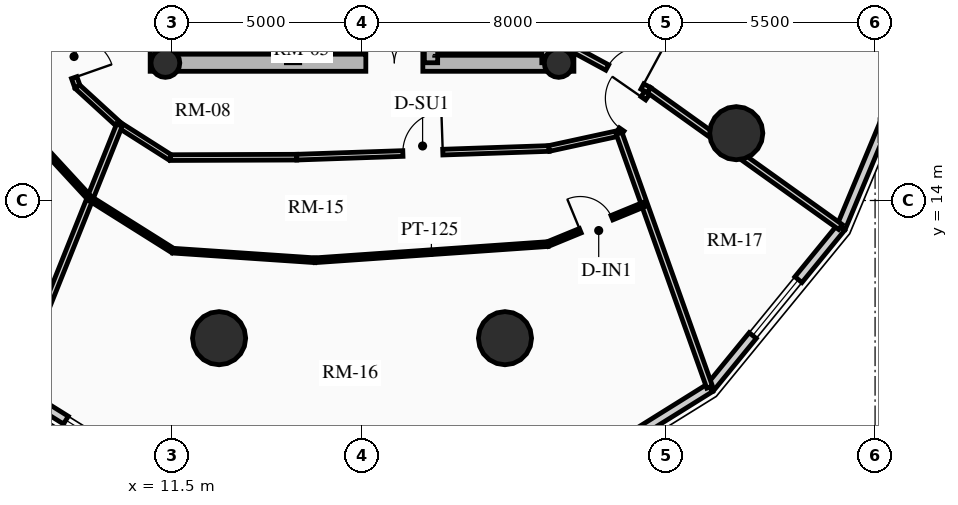
"""IFC4 building model, lengths in metres.
Left out: names, types, materials, properties, quantities, classifications, styles, units other than length and angle.
Written with IfcOpenShell. Run it as: python <this file> out.ifc"""

import sys

from ifc_helpers import new_model, si_unit, direction, frame, frame_2d, origin, origin_2d, place, context, subcontext, project, spatial, rectangle, circle, hollow_circle, extrude, source, transform, mapped, element, fill, save


model = new_model("IFC4")
c1 = context("Model", 3, precision=1e-05, world=origin(), true_north=direction((0.0, 1.0)))
c2 = subcontext(c1, "Body", "Model", "MODEL_VIEW")
j1 = project(units=[si_unit("LENGTHUNIT", "METRE"), si_unit("PLANEANGLEUNIT", "RADIAN")], contexts=[c1])
p1 = place(None, origin())
s1 = spatial("IfcSite", under=j1, at=p1, CompositionType="ELEMENT")
p2 = place(p1, origin())
s2 = spatial("IfcBuilding", under=s1, at=p2, CompositionType="ELEMENT")
p3 = place(p2, frame((0.0, 0.0, 105.07)))
s3 = spatial("IfcBuildingStorey", under=s2, at=p3, CompositionType="ELEMENT", Elevation=105.07)
for number, where, z_axis, x_axis in (
    (1, (11.15, 17.4, 0.0), (0.0, 0.0, 1.0), (0.0, 1.0, 0.0)),
    (2, (21.85, 17.4, 0.0), (0.0, 0.0, 1.0), (0.0, 1.0, 0.0)),
):
    element("IfcWall", number, at=place(p3, frame(where, z_axis=z_axis, x_axis=x_axis)), inside=s3, PredefinedType="SHEAR", context=c2, shape_type="SweptSolid", body=[
        extrude(rectangle(XDim=14.2, YDim=0.45, at=frame_2d((7.1, 0.0))), origin(), (0.0, 0.0, 1.0), 2.91),
    ])
p4 = place(p3, frame((11.15, 17.625, 0.0), z_axis=(0.0, 0.0, 1.0), x_axis=(1.0, 0.0, 0.0)))
e3 = element("IfcWall", 3, at=p4, inside=s3, PredefinedType="SHEAR", context=c2, shape_type="SweptSolid", body=[
    extrude(rectangle(XDim=10.7, YDim=0.45, at=frame_2d((5.35, 0.0))), origin(), (0.0, 0.0, 1.0), 2.91),
])
m1 = source(origin(), c2, "Body", "SweptSolid", [
    extrude(rectangle(XDim=1.5, YDim=2.02, at=frame_2d((0.75, 1.01))), frame((0.0, 0.235, 0.0), z_axis=(0.0, -1.0, 0.0), x_axis=(1.0, 0.0, 0.0)), (0.0, 0.0, 1.0), 0.47),
])
p5 = place(p4, frame((5.45, 0.0, 0.0)))
e4 = element("IfcOpeningElement", 4, at=p5, cuts=e3, PredefinedType="OPENING", context=c2, shape_type="MappedRepresentation", body=[
    mapped(m1, transform((0.0, 0.0, 0.0), x_axis=(1.0, 0.0, 0.0), y_axis=(0.0, 1.0, 0.0), z_axis=(0.0, 0.0, 1.0), scale=1.0)),
])
p6 = place(p3, frame((14.685, 17.625, 0.0), z_axis=(0.0, 0.0, 1.0), x_axis=(0.0, 1.0, 0.0)))
e5 = element("IfcWall", 5, at=p6, inside=s3, PredefinedType="SHEAR", context=c2, shape_type="SweptSolid", body=[
    extrude(rectangle(XDim=13.75, YDim=0.35, at=frame_2d((6.875, 0.0))), origin(), (0.0, 0.0, 1.0), 2.91),
])
m2 = source(origin(), c2, "Body", "SweptSolid", [
    extrude(rectangle(XDim=1.1, YDim=2.015, at=frame_2d((0.55, 1.007))), frame((0.0, 0.185, 0.0), z_axis=(0.0, -1.0, 0.0), x_axis=(1.0, 0.0, 0.0)), (0.0, 0.0, 1.0), 0.37),
])
p7 = place(p6, frame((4.875, 0.0, 0.0)))
e6 = element("IfcOpeningElement", 6, at=p7, cuts=e5, PredefinedType="OPENING", context=c2, shape_type="MappedRepresentation", body=[
    mapped(m2, transform((0.0, 0.0, 0.0), x_axis=(1.0, 0.0, 0.0), y_axis=(0.0, 1.0, 0.0), z_axis=(0.0, 0.0, 1.0), scale=1.0)),
])
m3 = source(origin(), c2, "Body", "SweptSolid", [
    extrude(rectangle(XDim=1.15, YDim=2.02, at=frame_2d((0.575, 1.01))), frame((0.0, 0.185, 0.0), z_axis=(0.0, -1.0, 0.0), x_axis=(1.0, 0.0, 0.0)), (0.0, 0.0, 1.0), 0.37),
])
p8 = place(p6, frame((7.295, 0.0, 0.0)))
e7 = element("IfcOpeningElement", 7, at=p8, cuts=e5, PredefinedType="OPENING", context=c2, shape_type="MappedRepresentation", body=[
    mapped(m3, transform((0.0, 0.0, 0.0), x_axis=(1.0, 0.0, 0.0), y_axis=(0.0, 1.0, 0.0), z_axis=(0.0, 0.0, 1.0), scale=1.0)),
])
p9 = place(p3, frame((18.315, 17.625, 0.0), z_axis=(0.0, 0.0, 1.0), x_axis=(0.0, 1.0, 0.0)))
e8 = element("IfcWall", 8, at=p9, inside=s3, PredefinedType="SHEAR", context=c2, shape_type="SweptSolid", body=[
    extrude(rectangle(XDim=13.75, YDim=0.35, at=frame_2d((6.875, 0.0))), origin(), (0.0, 0.0, 1.0), 2.91),
])
p10 = place(p9, frame((10.0, 0.0, 0.0)))
e9 = element("IfcOpeningElement", 9, at=p10, cuts=e8, PredefinedType="OPENING", context=c2, shape_type="MappedRepresentation", body=[
    mapped(m2, transform((0.0, 0.0, 0.0), x_axis=(1.0, 0.0, 0.0), y_axis=(0.0, 1.0, 0.0), z_axis=(0.0, 0.0, 1.0), scale=1.0)),
])
p11 = place(p9, frame((12.0, 0.0, 0.0)))
e10 = element("IfcOpeningElement", 10, at=p11, cuts=e8, PredefinedType="OPENING", context=c2, shape_type="MappedRepresentation", body=[
    mapped(m2, transform((0.0, 0.0, 0.0), x_axis=(1.0, 0.0, 0.0), y_axis=(0.0, 1.0, 0.0), z_axis=(0.0, 0.0, 1.0), scale=1.0)),
])
p12 = place(p9, frame((5.305, 0.0, 0.0)))
e11 = element("IfcOpeningElement", 11, at=p12, cuts=e8, PredefinedType="OPENING", context=c2, shape_type="MappedRepresentation", body=[
    mapped(m3, transform((0.0, 0.0, 0.0), x_axis=(1.0, 0.0, 0.0), y_axis=(0.0, 1.0, 0.0), z_axis=(0.0, 0.0, 1.0), scale=1.0)),
])
p13 = place(p3, frame((21.405, 17.625, 0.0), z_axis=(0.0, 0.0, 1.0), x_axis=(0.0, 1.0, 0.0)))
e12 = element("IfcWall", 12, at=p13, inside=s3, PredefinedType="SHEAR", context=c2, shape_type="SweptSolid", body=[
    extrude(rectangle(XDim=6.72, YDim=0.35, at=frame_2d((3.36, 0.0))), origin(), (0.0, 0.0, 1.0), 2.91),
])
for number, where, z_axis, x_axis in (
    (13, (11.325, 17.62, 0.0), (0.0, 0.0, 1.0), (1.0, 0.0, 0.0)),
    (14, (21.675, 17.62, 0.0), (0.0, 0.0, 1.0), (1.0, 0.0, 0.0)),
):
    element("IfcColumn", number, at=place(p3, frame(where, z_axis=z_axis, x_axis=x_axis)), inside=s3, PredefinedType="COLUMN", context=c2, shape_type="SweptSolid", body=[
        extrude(hollow_circle(Radius=0.38, WallThickness=0.032, at=origin_2d()), origin(), (0.0, 0.0, 1.0), 2.91),
    ])
for number, where, z_axis, x_axis in (
    (15, (12.739, 10.377, 0.0), (0.0, 0.0, 1.0), (1.0, 0.0, 0.0)),
    (16, (20.261, 10.377, 0.0), (0.0, 0.0, 1.0), (1.0, 0.0, 0.0)),
    (17, (26.347, 15.771, 0.0), (0.0, 0.0, 1.0), (1.0, 0.0, 0.0)),
):
    element("IfcColumn", number, at=place(p3, frame(where, z_axis=z_axis, x_axis=x_axis)), inside=s3, PredefinedType="USERDEFINED", context=c2, shape_type="SweptSolid", body=[
        extrude(circle(Radius=0.7, at=origin_2d()), origin(), (0.0, 0.0, 1.0), 2.91),
    ])
p14 = place(p3, frame((11.685, 6.363, 0.0), z_axis=(0.0, 0.0, 1.0), x_axis=(-0.848520380187, 0.529162701263, 0.0)))
e18 = element("IfcWall", 18, at=p14, inside=s3, PredefinedType="SOLIDWALL", context=c2, shape_type="SweptSolid", body=[
    extrude(rectangle(XDim=5.119, YDim=0.24, at=frame_2d((2.56, 0.0))), origin(), (0.0, 0.0, 1.0), 2.179),
])
m4 = source(origin(), c2, "Body", "SweptSolid", [
    extrude(rectangle(XDim=1.9, YDim=1.35, at=frame_2d((0.95, 0.675))), frame((0.0, 0.13, 0.0), z_axis=(0.0, -1.0, 0.0), x_axis=(1.0, 0.0, 0.0)), (0.0, 0.0, 1.0), 0.26),
])
p15 = place(p14, frame((1.609, 0.0, 0.65)))
e19 = element("IfcOpeningElement", 19, at=p15, cuts=e18, PredefinedType="OPENING", context=c2, shape_type="MappedRepresentation", body=[
    mapped(m4, transform((0.0, 0.0, 0.0), x_axis=(1.0, 0.0, 0.0), y_axis=(0.0, 1.0, 0.0), z_axis=(0.0, 0.0, 1.0), scale=1.0)),
])
p16 = place(p3, frame((25.658, 9.072, 0.0), z_axis=(0.0, 0.0, 1.0), x_axis=(-0.848520380187, -0.529162701263, 0.0)))
e20 = element("IfcWall", 20, at=p16, inside=s3, PredefinedType="SOLIDWALL", context=c2, shape_type="SweptSolid", body=[
    extrude(rectangle(XDim=5.119, YDim=0.24, at=frame_2d((2.56, 0.0))), origin(), (0.0, 0.0, 1.0), 2.179),
])
p17 = place(p3, frame((29.105, 13.291, 0.0), z_axis=(0.0, 0.0, 1.0), x_axis=(-0.632700781152, -0.77439635945, 0.0)))
e21 = element("IfcWall", 21, at=p17, inside=s3, PredefinedType="SOLIDWALL", context=c2, shape_type="SweptSolid", body=[
    extrude(rectangle(XDim=5.448, YDim=0.24, at=frame_2d((2.724, 0.0))), origin(), (0.0, 0.0, 1.0), 2.179),
])
p18 = place(p17, frame((1.774, 0.0, 0.65)))
e22 = element("IfcOpeningElement", 22, at=p18, cuts=e21, PredefinedType="OPENING", context=c2, shape_type="MappedRepresentation", body=[
    mapped(m4, transform((0.0, 0.0, 0.0), x_axis=(1.0, 0.0, 0.0), y_axis=(0.0, 1.0, 0.0), z_axis=(0.0, 0.0, 1.0), scale=1.0)),
])
p19 = place(p3, frame((31.318, 18.607, 0.0), z_axis=(0.0, 0.0, 1.0), x_axis=(-0.384344417632, -0.923189779317, 0.0)))
e23 = element("IfcWall", 23, at=p19, inside=s3, PredefinedType="SOLIDWALL", context=c2, shape_type="SweptSolid", body=[
    extrude(rectangle(XDim=5.758, YDim=0.24, at=frame_2d((2.879, 0.0))), origin(), (0.0, 0.0, 1.0), 2.179),
])
p20 = place(p3, frame((8.538, 18.338, 0.0), z_axis=(0.0, 0.0, 1.0), x_axis=(0.331358150167, -0.94350504838, 0.0)))
e24 = element("IfcWall", 24, at=p20, inside=s3, PredefinedType="PARTITIONING", context=c2, shape_type="SweptSolid", body=[
    extrude(rectangle(XDim=1.424, YDim=0.15, at=frame_2d((0.712, 0.0))), origin(), (0.0, 0.0, 1.0), 2.225),
])
m5 = source(origin(), c2, "Body", "SweptSolid", [
    extrude(rectangle(XDim=1.05, YDim=2.015, at=frame_2d((0.525, 1.007))), frame((0.0, 0.085, 0.0), z_axis=(0.0, -1.0, 0.0), x_axis=(1.0, 0.0, 0.0)), (0.0, 0.0, 1.0), 0.17),
])
p21 = place(p20, frame((0.12, 0.0, 0.0)))
e25 = element("IfcOpeningElement", 25, at=p21, cuts=e24, PredefinedType="OPENING", context=c2, shape_type="MappedRepresentation", body=[
    mapped(m5, transform((0.0, 0.0, 0.0), x_axis=(1.0, 0.0, 0.0), y_axis=(0.0, 1.0, 0.0), z_axis=(0.0, 0.0, 1.0), scale=1.0)),
])
p22 = place(p3, frame((9.01, 16.994, 0.0), z_axis=(0.0, 0.0, 1.0), x_axis=(0.737701798986, -0.67512669609, 0.0)))
e26 = element("IfcWall", 26, at=p22, inside=s3, PredefinedType="PARTITIONING", context=c2, shape_type="SweptSolid", body=[
    extrude(rectangle(XDim=1.498, YDim=0.15, at=frame_2d((0.749, 0.0))), origin(), (0.0, 0.0, 1.0), 2.225),
])
p23 = place(p3, frame((10.115, 15.983, 0.0), z_axis=(0.0, 0.0, 1.0), x_axis=(0.843995849351, -0.536349705209, 0.0)))
e27 = element("IfcWall", 27, at=p23, inside=s3, PredefinedType="PARTITIONING", context=c2, shape_type="SweptSolid", body=[
    extrude(rectangle(XDim=1.593, YDim=0.15, at=frame_2d((0.796, 0.0))), origin(), (0.0, 0.0, 1.0), 2.225),
])
p24 = place(p3, frame((11.46, 15.129, 0.0), z_axis=(0.0, 0.0, 1.0), x_axis=(0.999993513287, 0.003601858435, 0.0)))
e28 = element("IfcWall", 28, at=p24, inside=s3, PredefinedType="PARTITIONING", context=c2, shape_type="SweptSolid", body=[
    extrude(rectangle(XDim=3.321, YDim=0.15, at=frame_2d((1.661, 0.0))), origin(), (0.0, 0.0, 1.0), 2.225),
])
p25 = place(p3, frame((14.781, 15.141, 0.0), z_axis=(0.0, 0.0, 1.0), x_axis=(0.999407918707, 0.034406569513, 0.0)))
e29 = element("IfcWall", 29, at=p25, inside=s3, PredefinedType="PARTITIONING", context=c2, shape_type="SweptSolid", body=[
    extrude(rectangle(XDim=6.642, YDim=0.15, at=frame_2d((3.321, 0.0))), origin(), (0.0, 0.0, 1.0), 2.225),
])
p26 = place(p25, frame((2.796, 0.0, 0.0)))
e30 = element("IfcOpeningElement", 30, at=p26, cuts=e29, PredefinedType="OPENING", context=c2, shape_type="MappedRepresentation", body=[
    mapped(m5, transform((0.0, 0.0, 0.0), x_axis=(1.0, 0.0, 0.0), y_axis=(0.0, 1.0, 0.0), z_axis=(0.0, 0.0, 1.0), scale=1.0)),
])
p27 = place(p3, frame((21.419, 15.369, 0.0), z_axis=(0.0, 0.0, 1.0), x_axis=(0.977192701953, 0.212354475464, 0.0)))
e31 = element("IfcWall", 31, at=p27, inside=s3, PredefinedType="PARTITIONING", context=c2, shape_type="SweptSolid", body=[
    extrude(rectangle(XDim=1.888, YDim=0.15, at=frame_2d((0.944, 0.0))), origin(), (0.0, 0.0, 1.0), 2.225),
])
p28 = place(p3, frame((23.263, 15.77, 0.0), z_axis=(0.0, 0.0, 1.0), x_axis=(0.570743456919, 0.821128434768, 0.0)))
e32 = element("IfcWall", 32, at=p28, inside=s3, PredefinedType="PARTITIONING", context=c2, shape_type="SweptSolid", body=[
    extrude(rectangle(XDim=1.382, YDim=0.15, at=frame_2d((0.691, 0.0))), origin(), (0.0, 0.0, 1.0), 2.225),
])
m6 = source(origin(), c2, "Body", "SweptSolid", [
    extrude(rectangle(XDim=1.0, YDim=2.015, at=frame_2d((0.5, 1.007))), frame((0.0, 0.085, 0.0), z_axis=(0.0, -1.0, 0.0), x_axis=(1.0, 0.0, 0.0)), (0.0, 0.0, 1.0), 0.17),
])
p29 = place(p28, frame((0.12, 0.0, 0.0)))
e33 = element("IfcOpeningElement", 33, at=p29, cuts=e32, PredefinedType="OPENING", context=c2, shape_type="MappedRepresentation", body=[
    mapped(m6, transform((0.0, 0.0, 0.0), x_axis=(1.0, 0.0, 0.0), y_axis=(0.0, 1.0, 0.0), z_axis=(0.0, 0.0, 1.0), scale=1.0)),
])
p30 = place(p3, frame((10.115, 15.983, 0.0), z_axis=(0.0, 0.0, 1.0), x_axis=(-0.371861013147, -0.928288417951, 0.0)))
e34 = element("IfcWall", 34, at=p30, inside=s3, PredefinedType="PARTITIONING", context=c2, shape_type="SweptSolid", body=[
    extrude(rectangle(XDim=7.427, YDim=0.16, at=frame_2d((3.714, 0.0))), origin(), (0.0, 0.0, 1.0), 2.179),
])
p31 = place(p3, frame((23.263, 15.77, 0.0), z_axis=(0.0, 0.0, 1.0), x_axis=(0.335919964206, -0.941890533793, 0.0)))
e35 = element("IfcWall", 35, at=p31, inside=s3, PredefinedType="PARTITIONING", context=c2, shape_type="SweptSolid", body=[
    extrude(rectangle(XDim=7.094, YDim=0.16, at=frame_2d((3.547, 0.0))), origin(), (0.0, 0.0, 1.0), 2.179),
])
p32 = place(p3, frame((24.052, 16.905, 0.0), z_axis=(0.0, 0.0, 1.0), x_axis=(0.813437670746, -0.581652091727, 0.0)))
e36 = element("IfcWall", 36, at=p32, inside=s3, PredefinedType="PARTITIONING", context=c2, shape_type="SweptSolid", body=[
    extrude(rectangle(XDim=6.192, YDim=0.16, at=frame_2d((3.096, 0.0))), origin(), (0.0, 0.0, 1.0), 2.179),
])
p33 = place(p3, frame((22.075, 17.975, 0.0), z_axis=(0.0, 0.0, 1.0), x_axis=(0.879356383302, -0.476164206073, 0.0)))
e37 = element("IfcWall", 37, at=p33, inside=s3, PredefinedType="PARTITIONING", context=c2, shape_type="SweptSolid", body=[
    extrude(rectangle(XDim=2.248, YDim=0.16, at=frame_2d((1.124, 0.0))), origin(), (0.0, 0.0, 1.0), 2.225),
])
m7 = source(origin(), c2, "Body", "SweptSolid", [
    extrude(rectangle(XDim=1.05, YDim=2.015, at=frame_2d((0.525, 1.007))), frame((0.0, 0.09, 0.0), z_axis=(0.0, -1.0, 0.0), x_axis=(1.0, 0.0, 0.0)), (0.0, 0.0, 1.0), 0.18),
])
p34 = place(p33, frame((0.998, 0.0, 0.0)))
e38 = element("IfcOpeningElement", 38, at=p34, cuts=e37, PredefinedType="OPENING", context=c2, shape_type="MappedRepresentation", body=[
    mapped(m7, transform((0.0, 0.0, 0.0), x_axis=(1.0, 0.0, 0.0), y_axis=(0.0, 1.0, 0.0), z_axis=(0.0, 0.0, 1.0), scale=1.0)),
])
p35 = place(p3, frame((7.583, 15.961, 0.0), z_axis=(0.0, 0.0, 1.0), x_axis=(0.677838563189, -0.735210774032, 0.0)))
e39 = element("IfcWall", 39, at=p35, inside=s3, PredefinedType="PARTITIONING", context=c2, shape_type="SweptSolid", body=[
    extrude(rectangle(XDim=2.596, YDim=0.125, at=frame_2d((1.298, 0.0))), origin(), (0.0, 0.0, 1.0), 2.655),
])
p36 = place(p3, frame((9.342, 14.052, 0.0), z_axis=(0.0, 0.0, 1.0), x_axis=(0.846526826244, -0.532346064557, 0.0)))
e40 = element("IfcWall", 40, at=p36, inside=s3, PredefinedType="PARTITIONING", context=c2, shape_type="SweptSolid", body=[
    extrude(rectangle(XDim=2.578, YDim=0.125, at=frame_2d((1.289, 0.0))), origin(), (0.0, 0.0, 1.0), 2.225),
])
p37 = place(p3, frame((11.525, 12.68, 0.0), z_axis=(0.0, 0.0, 1.0), x_axis=(0.997726815836, -0.067388433443, 0.0)))
e41 = element("IfcWall", 41, at=p37, inside=s3, PredefinedType="PARTITIONING", context=c2, shape_type="SweptSolid", body=[
    extrude(rectangle(XDim=3.746, YDim=0.125, at=frame_2d((1.873, 0.0))), origin(), (0.0, 0.0, 1.0), 2.225),
])
p38 = place(p3, frame((15.262, 12.427, 0.0), z_axis=(0.0, 0.0, 1.0), x_axis=(0.997595855995, 0.069300130605, 0.0)))
e42 = element("IfcWall", 42, at=p38, inside=s3, PredefinedType="PARTITIONING", context=c2, shape_type="SweptSolid", body=[
    extrude(rectangle(XDim=6.14, YDim=0.125, at=frame_2d((3.07, 0.0))), origin(), (0.0, 0.0, 1.0), 2.225),
])
p39 = place(p3, frame((21.388, 12.853, 0.0), z_axis=(0.0, 0.0, 1.0), x_axis=(0.924757149715, 0.380557767036, 0.0)))
e43 = element("IfcWall", 43, at=p39, inside=s3, PredefinedType="PARTITIONING", context=c2, shape_type="SweptSolid", body=[
    extrude(rectangle(XDim=2.75, YDim=0.125, at=frame_2d((1.375, 0.0))), origin(), (0.0, 0.0, 1.0), 2.179),
])
m8 = source(origin(), c2, "Body", "SweptSolid", [
    extrude(rectangle(XDim=0.9, YDim=2.005, at=frame_2d((0.45, 1.002))), frame((0.0, 0.073, 0.0), z_axis=(0.0, -1.0, 0.0), x_axis=(1.0, 0.0, 0.0)), (0.0, 0.0, 1.0), 0.145),
])
p40 = place(p39, frame((0.925, 0.0, 0.0)))
e44 = element("IfcOpeningElement", 44, at=p40, cuts=e43, PredefinedType="OPENING", context=c2, shape_type="MappedRepresentation", body=[
    mapped(m8, transform((0.0, 0.0, 0.0), x_axis=(1.0, 0.0, 0.0), y_axis=(0.0, 1.0, 0.0), z_axis=(0.0, 0.0, 1.0), scale=1.0)),
])
m9 = source(origin(), c2, "Body", "SweptSolid", [
    extrude(rectangle(XDim=1.9, YDim=1.35, at=frame_2d((0.95, 0.675))), frame((0.0, 0.03, 0.0), z_axis=(0.0, -1.0, 0.0), x_axis=(1.0, 0.0, 0.0)), (0.0, 0.0, 1.0), 0.06),
])
p41 = place(p15, origin())
e45 = element("IfcWindow", 45, at=p41, inside=s3, PartitioningType="DOUBLE_PANEL_VERTICAL", PredefinedType="WINDOW", context=c2, shape_type="MappedRepresentation", body=[
    mapped(m9, transform((0.0, 0.0, 0.0), x_axis=(1.0, 0.0, 0.0), y_axis=(0.0, 1.0, 0.0), z_axis=(0.0, 0.0, 1.0), scale=1.0)),
])
fill(e19, e45)
p42 = place(p18, origin())
e46 = element("IfcWindow", 46, at=p42, inside=s3, PartitioningType="DOUBLE_PANEL_VERTICAL", PredefinedType="WINDOW", context=c2, shape_type="MappedRepresentation", body=[
    mapped(m9, transform((0.0, 0.0, 0.0), x_axis=(1.0, 0.0, 0.0), y_axis=(0.0, 1.0, 0.0), z_axis=(0.0, 0.0, 1.0), scale=1.0)),
])
fill(e22, e46)
m10 = source(origin(), c2, "Body", "SweptSolid", [
    extrude(rectangle(XDim=1.5, YDim=2.02, at=frame_2d((0.75, 1.01))), frame((0.0, 0.025, 0.0), z_axis=(0.0, -1.0, 0.0), x_axis=(1.0, 0.0, 0.0)), (0.0, 0.0, 1.0), 0.05),
])
p43 = place(p5, origin())
e47 = element("IfcDoor", 47, at=p43, inside=s3, OperationType="DOUBLE_DOOR_SINGLE_SWING", PredefinedType="DOOR", context=c2, shape_type="MappedRepresentation", body=[
    mapped(m10, transform((0.0, 0.0, 0.0), x_axis=(1.0, 0.0, 0.0), y_axis=(0.0, 1.0, 0.0), z_axis=(0.0, 0.0, 1.0), scale=1.0)),
])
fill(e4, e47)
m11 = source(origin(), c2, "Body", "SweptSolid", [
    extrude(rectangle(XDim=1.05, YDim=2.015, at=frame_2d((0.525, 1.007))), frame((0.0, 0.025, 0.0), z_axis=(0.0, -1.0, 0.0), x_axis=(1.0, 0.0, 0.0)), (0.0, 0.0, 1.0), 0.05),
])
p44 = place(p34, origin())
e48 = element("IfcDoor", 48, at=p44, inside=s3, OperationType="SINGLE_SWING_RIGHT", PredefinedType="DOOR", context=c2, shape_type="MappedRepresentation", body=[
    mapped(m11, transform((0.0, 0.0, 0.0), x_axis=(1.0, 0.0, 0.0), y_axis=(0.0, 1.0, 0.0), z_axis=(0.0, 0.0, 1.0), scale=1.0)),
])
fill(e38, e48)
p45 = place(p21, origin())
e49 = element("IfcDoor", 49, at=p45, inside=s3, OperationType="SINGLE_SWING_RIGHT", PredefinedType="DOOR", context=c2, shape_type="MappedRepresentation", body=[
    mapped(m11, transform((0.0, 0.0, 0.0), x_axis=(1.0, 0.0, 0.0), y_axis=(0.0, 1.0, 0.0), z_axis=(0.0, 0.0, 1.0), scale=1.0)),
])
fill(e25, e49)
p46 = place(p26, origin())
e50 = element("IfcDoor", 50, at=p46, inside=s3, OperationType="SINGLE_SWING_RIGHT", PredefinedType="DOOR", context=c2, shape_type="MappedRepresentation", body=[
    mapped(m11, transform((0.0, 0.0, 0.0), x_axis=(1.0, 0.0, 0.0), y_axis=(0.0, 1.0, 0.0), z_axis=(0.0, 0.0, 1.0), scale=1.0)),
])
fill(e30, e50)
m12 = source(origin(), c2, "Body", "SweptSolid", [
    extrude(rectangle(XDim=0.9, YDim=2.005, at=frame_2d((0.45, 1.002))), frame((0.0, 0.025, 0.0), z_axis=(0.0, -1.0, 0.0), x_axis=(1.0, 0.0, 0.0)), (0.0, 0.0, 1.0), 0.05),
])
p47 = place(p40, origin())
e51 = element("IfcDoor", 51, at=p47, inside=s3, OperationType="SINGLE_SWING_LEFT", PredefinedType="DOOR", context=c2, shape_type="MappedRepresentation", body=[
    mapped(m12, transform((0.0, 0.0, 0.0), x_axis=(1.0, 0.0, 0.0), y_axis=(0.0, 1.0, 0.0), z_axis=(0.0, 0.0, 1.0), scale=1.0)),
])
fill(e44, e51)
m13 = source(origin(), c2, "Body", "SweptSolid", [
    extrude(rectangle(XDim=1.0, YDim=2.015, at=frame_2d((0.5, 1.007))), frame((0.0, 0.025, 0.0), z_axis=(0.0, -1.0, 0.0), x_axis=(1.0, 0.0, 0.0)), (0.0, 0.0, 1.0), 0.05),
])
p48 = place(p29, origin())
e52 = element("IfcDoor", 52, at=p48, inside=s3, OperationType="SINGLE_SWING_RIGHT", PredefinedType="DOOR", context=c2, shape_type="MappedRepresentation", body=[
    mapped(m13, transform((0.0, 0.0, 0.0), x_axis=(1.0, 0.0, 0.0), y_axis=(0.0, 1.0, 0.0), z_axis=(0.0, 0.0, 1.0), scale=1.0)),
])
fill(e33, e52)
save(model, sys.argv[1])
